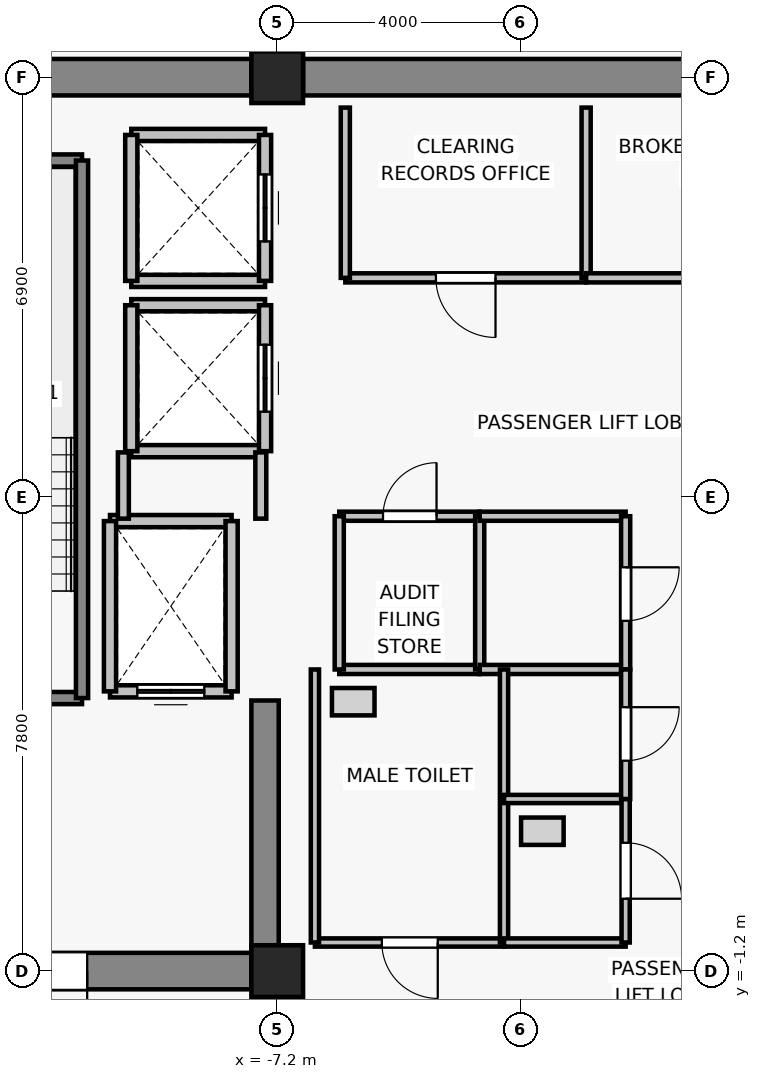
"""IFC4 building model, lengths in metres.
Left out: names, types, materials, properties, quantities, classifications, styles, units other than length and angle.
Written with IfcOpenShell. Run it as: python <this file> out.ifc"""

import sys

from ifc_helpers import new_model, si_unit, direction, frame, frame_2d, origin, origin_2d, place, context, subcontext, project, spatial, rectangle, extrude, source, transform, mapped, element, fill, save


model = new_model("IFC4")
c1 = context("Model", 3, precision=1e-05, world=origin(), true_north=direction((0.0, 1.0)))
c2 = subcontext(c1, "Body", "Model", "MODEL_VIEW")
j1 = project(units=[si_unit("LENGTHUNIT", "METRE"), si_unit("PLANEANGLEUNIT", "RADIAN")], contexts=[c1])
p1 = place(None, origin())
s1 = spatial("IfcSite", under=j1, at=p1, CompositionType="ELEMENT")
p2 = place(p1, origin())
s2 = spatial("IfcBuilding", under=s1, at=p2, CompositionType="ELEMENT")
p3 = place(p2, frame((0.0, 0.0, 241.9)))
s3 = spatial("IfcBuildingStorey", under=s2, at=p3, CompositionType="ELEMENT", Elevation=241.9)
for number, where, z_axis, x_axis in (
    (1, (-7.2, -1.2, 0.0), (0.0, 0.0, 1.0), (1.0, 0.0, 0.0)),
    (2, (-7.2, 13.5, 0.0), (0.0, 0.0, 1.0), (1.0, 0.0, 0.0)),
):
    element("IfcColumn", number, at=place(p3, frame(where, z_axis=z_axis, x_axis=x_axis)), inside=s3, PredefinedType="COLUMN", context=c2, shape_type="SweptSolid", body=[
        extrude(rectangle(XDim=0.85, YDim=0.85, at=origin_2d()), origin(), (0.0, 0.0, 1.0), 3.3),
    ])
p4 = place(p3, frame((-13.975, 13.5, 0.0), z_axis=(0.0, 0.0, 1.0), x_axis=(1.0, 0.0, 0.0)))
e3 = element("IfcWall", 3, at=p4, inside=s3, PredefinedType="SHEAR", context=c2, shape_type="SweptSolid", body=[
    extrude(rectangle(XDim=6.35, YDim=0.6, at=frame_2d((3.175, 0.0))), origin(), (0.0, 0.0, 1.0), 3.075),
])
p5 = place(p3, frame((-6.775, 13.5, 0.0), z_axis=(0.0, 0.0, 1.0), x_axis=(1.0, 0.0, 0.0)))
e4 = element("IfcWall", 4, at=p5, inside=s3, PredefinedType="SHEAR", context=c2, shape_type="SweptSolid", body=[
    extrude(rectangle(XDim=13.55, YDim=0.6, at=frame_2d((6.775, 0.0))), origin(), (0.0, 0.0, 1.0), 3.075),
])
p6 = place(p3, frame((-7.625, -1.2, 0.0), z_axis=(0.0, 0.0, 1.0), x_axis=(-1.0, 0.0, 0.0)))
e5 = element("IfcWall", 5, at=p6, inside=s3, PredefinedType="SHEAR", context=c2, shape_type="SweptSolid", body=[
    extrude(rectangle(XDim=6.35, YDim=0.6, at=frame_2d((3.175, 0.0))), origin(), (0.0, 0.0, 1.0), 3.075),
])
p7 = place(p6, frame((2.7, 0.0, 0.0)))
e6 = element("IfcOpeningElement", 6, at=p7, cuts=e5, PredefinedType="OPENING", context=c2, shape_type="SweptSolid", body=[
    extrude(rectangle(XDim=1.15, YDim=2.15, at=frame_2d((0.575, 1.075))), frame((0.0, 0.31, 0.0), z_axis=(0.0, -1.0, 0.0), x_axis=(1.0, 0.0, 0.0)), (0.0, 0.0, 1.0), 0.62),
])
p8 = place(p3, frame((-7.4, -0.9, 0.0), z_axis=(0.0, 0.0, 1.0), x_axis=(0.0, 1.0, 0.0)))
e7 = element("IfcWall", 7, at=p8, inside=s3, PredefinedType="SHEAR", context=c2, shape_type="SweptSolid", body=[
    extrude(rectangle(XDim=4.15, YDim=0.45, at=frame_2d((2.075, 0.0))), origin(), (0.0, 0.0, 1.0), 3.075),
])
p9 = place(p3, frame((-7.95, 3.4, 0.0), z_axis=(0.0, 0.0, 1.0), x_axis=(-1.0, 0.0, 0.0)))
e8 = element("IfcWall", 8, at=p9, inside=s3, PredefinedType="SOLIDWALL", context=c2, shape_type="SweptSolid", body=[
    extrude(rectangle(XDim=2.0, YDim=0.2, at=frame_2d((1.0, 0.0))), origin(), (0.0, 0.0, 1.0), 3.075),
])
p10 = place(p9, frame((0.45, 0.0, 0.0)))
e9 = element("IfcOpeningElement", 9, at=p10, cuts=e8, PredefinedType="OPENING", context=c2, shape_type="SweptSolid", body=[
    extrude(rectangle(XDim=1.1, YDim=2.2, at=frame_2d((0.55, 1.1))), frame((0.0, 0.11, 0.0), z_axis=(0.0, -1.0, 0.0), x_axis=(1.0, 0.0, 0.0)), (0.0, 0.0, 1.0), 0.22),
])
p11 = place(p3, frame((-9.95, 6.2, 0.0), z_axis=(0.0, 0.0, 1.0), x_axis=(1.0, 0.0, 0.0)))
e10 = element("IfcWall", 10, at=p11, inside=s3, PredefinedType="SOLIDWALL", context=c2, shape_type="SweptSolid", body=[
    extrude(rectangle(XDim=2.0, YDim=0.2, at=frame_2d((1.0, 0.0))), origin(), (0.0, 0.0, 1.0), 3.075),
])
for number, where, z_axis, x_axis in (
    (11, (-9.95, 3.4, 0.0), (0.0, 0.0, 1.0), (0.0, 1.0, 0.0)),
    (12, (-7.95, 6.2, 0.0), (0.0, 0.0, 1.0), (0.0, -1.0, 0.0)),
):
    element("IfcWall", number, at=place(p3, frame(where, z_axis=z_axis, x_axis=x_axis)), inside=s3, PredefinedType="SOLIDWALL", context=c2, shape_type="SweptSolid", body=[
        extrude(rectangle(XDim=2.8, YDim=0.2, at=frame_2d((1.4, 0.0))), origin(), (0.0, 0.0, 1.0), 3.075),
    ])
for number, where, z_axis, x_axis in (
    (13, (-7.4, 7.35, 0.0), (0.0, 0.0, 1.0), (-1.0, 0.0, 0.0)),
    (14, (-9.6, 9.75, 0.0), (0.0, 0.0, 1.0), (1.0, 0.0, 0.0)),
):
    element("IfcWall", number, at=place(p3, frame(where, z_axis=z_axis, x_axis=x_axis)), inside=s3, PredefinedType="SOLIDWALL", context=c2, shape_type="SweptSolid", body=[
        extrude(rectangle(XDim=2.2, YDim=0.2, at=frame_2d((1.1, 0.0))), origin(), (0.0, 0.0, 1.0), 2.615),
    ])
p12 = place(p3, frame((-9.6, 7.35, 0.0), z_axis=(0.0, 0.0, 1.0), x_axis=(0.0, 1.0, 0.0)))
e15 = element("IfcWall", 15, at=p12, inside=s3, PredefinedType="SOLIDWALL", context=c2, shape_type="SweptSolid", body=[
    extrude(rectangle(XDim=2.4, YDim=0.2, at=frame_2d((1.2, 0.0))), origin(), (0.0, 0.0, 1.0), 3.075),
])
p13 = place(p3, frame((-7.4, 9.75, 0.0), z_axis=(0.0, 0.0, 1.0), x_axis=(0.0, -1.0, 0.0)))
e16 = element("IfcWall", 16, at=p13, inside=s3, PredefinedType="SOLIDWALL", context=c2, shape_type="SweptSolid", body=[
    extrude(rectangle(XDim=2.4, YDim=0.2, at=frame_2d((1.2, 0.0))), origin(), (0.0, 0.0, 1.0), 2.615),
])
p14 = place(p13, frame((0.65, 0.0, 0.0)))
e17 = element("IfcOpeningElement", 17, at=p14, cuts=e16, PredefinedType="OPENING", context=c2, shape_type="SweptSolid", body=[
    extrude(rectangle(XDim=1.1, YDim=2.2, at=frame_2d((0.55, 1.1))), frame((0.0, 0.11, 0.0), z_axis=(0.0, -1.0, 0.0), x_axis=(1.0, 0.0, 0.0)), (0.0, 0.0, 1.0), 0.22),
])
for number, where, z_axis, x_axis in (
    (18, (-7.4, 10.15, 0.0), (0.0, 0.0, 1.0), (-1.0, 0.0, 0.0)),
    (19, (-9.6, 12.55, 0.0), (0.0, 0.0, 1.0), (1.0, 0.0, 0.0)),
):
    element("IfcWall", number, at=place(p3, frame(where, z_axis=z_axis, x_axis=x_axis)), inside=s3, PredefinedType="SOLIDWALL", context=c2, shape_type="SweptSolid", body=[
        extrude(rectangle(XDim=2.2, YDim=0.2, at=frame_2d((1.1, 0.0))), origin(), (0.0, 0.0, 1.0), 2.615),
    ])
p15 = place(p3, frame((-9.6, 10.15, 0.0), z_axis=(0.0, 0.0, 1.0), x_axis=(0.0, 1.0, 0.0)))
e20 = element("IfcWall", 20, at=p15, inside=s3, PredefinedType="SOLIDWALL", context=c2, shape_type="SweptSolid", body=[
    extrude(rectangle(XDim=2.4, YDim=0.2, at=frame_2d((1.2, 0.0))), origin(), (0.0, 0.0, 1.0), 3.075),
])
p16 = place(p3, frame((-7.4, 12.55, 0.0), z_axis=(0.0, 0.0, 1.0), x_axis=(0.0, -1.0, 0.0)))
e21 = element("IfcWall", 21, at=p16, inside=s3, PredefinedType="SOLIDWALL", context=c2, shape_type="SweptSolid", body=[
    extrude(rectangle(XDim=2.4, YDim=0.2, at=frame_2d((1.2, 0.0))), origin(), (0.0, 0.0, 1.0), 2.615),
])
p17 = place(p16, frame((0.65, 0.0, 0.0)))
e22 = element("IfcOpeningElement", 22, at=p17, cuts=e21, PredefinedType="OPENING", context=c2, shape_type="SweptSolid", body=[
    extrude(rectangle(XDim=1.1, YDim=2.2, at=frame_2d((0.55, 1.1))), frame((0.0, 0.11, 0.0), z_axis=(0.0, -1.0, 0.0), x_axis=(1.0, 0.0, 0.0)), (0.0, 0.0, 1.0), 0.22),
])
p18 = place(p3, frame((-10.41, 3.29, 0.0), z_axis=(0.0, 0.0, 1.0), x_axis=(-1.0, 0.0, 0.0)))
e23 = element("IfcWall", 23, at=p18, inside=s3, PredefinedType="SOLIDWALL", context=c2, shape_type="SweptSolid", body=[
    extrude(rectangle(XDim=3.52, YDim=0.2, at=frame_2d((1.76, 0.0))), origin(), (0.0, 0.0, 1.0), 3.075),
])
p19 = place(p18, frame((1.165, 0.0, 0.0)))
e24 = element("IfcOpeningElement", 24, at=p19, cuts=e23, PredefinedType="OPENING", context=c2, shape_type="SweptSolid", body=[
    extrude(rectangle(XDim=1.15, YDim=2.15, at=frame_2d((0.575, 1.075))), frame((0.0, 0.11, 0.0), z_axis=(0.0, -1.0, 0.0), x_axis=(1.0, 0.0, 0.0)), (0.0, 0.0, 1.0), 0.22),
])
p20 = place(p3, frame((-13.93, 12.13, 0.0), z_axis=(0.0, 0.0, 1.0), x_axis=(1.0, 0.0, 0.0)))
e25 = element("IfcWall", 25, at=p20, inside=s3, PredefinedType="SOLIDWALL", context=c2, shape_type="SweptSolid", body=[
    extrude(rectangle(XDim=3.52, YDim=0.2, at=frame_2d((1.76, 0.0))), origin(), (0.0, 0.0, 1.0), 3.075),
])
p21 = place(p3, frame((-10.41, 12.13, 0.0), z_axis=(0.0, 0.0, 1.0), x_axis=(0.0, -1.0, 0.0)))
e26 = element("IfcWall", 26, at=p21, inside=s3, PredefinedType="SOLIDWALL", context=c2, shape_type="SweptSolid", body=[
    extrude(rectangle(XDim=8.84, YDim=0.2, at=frame_2d((4.42, 0.0))), origin(), (0.0, 0.0, 1.0), 3.075),
])
p22 = place(p3, frame((-9.73, 6.24, 0.0), z_axis=(0.0, 0.0, 1.0), x_axis=(0.0, 1.0, 0.0)))
e27 = element("IfcWall", 27, at=p22, inside=s3, PredefinedType="PARTITIONING", context=c2, shape_type="SweptSolid", body=[
    extrude(rectangle(XDim=1.09, YDim=0.18, at=frame_2d((0.545, 0.0))), origin(), (0.0, 0.0, 1.0), 3.075),
])
p23 = place(p3, frame((-7.47, 7.33, 0.0), z_axis=(0.0, 0.0, 1.0), x_axis=(0.0, -1.0, 0.0)))
e28 = element("IfcWall", 28, at=p23, inside=s3, PredefinedType="PARTITIONING", context=c2, shape_type="SweptSolid", body=[
    extrude(rectangle(XDim=1.09, YDim=0.18, at=frame_2d((0.545, 0.0))), origin(), (0.0, 0.0, 1.0), 2.615),
])
p24 = place(p3, frame((-2.12, 10.2, 0.0), z_axis=(0.0, 0.0, 1.0), x_axis=(-1.0, 0.0, 0.0)))
e29 = element("IfcWall", 29, at=p24, inside=s3, PredefinedType="PARTITIONING", context=c2, shape_type="SweptSolid", body=[
    extrude(rectangle(XDim=3.96, YDim=0.15, at=frame_2d((1.98, 0.0))), origin(), (0.0, 0.0, 1.0), 3.075),
])
p25 = place(p24, frame((1.49, 0.0, 0.0)))
e30 = element("IfcOpeningElement", 30, at=p25, cuts=e29, PredefinedType="OPENING", context=c2, shape_type="SweptSolid", body=[
    extrude(rectangle(XDim=0.98, YDim=2.15, at=frame_2d((0.49, 1.075))), frame((0.0, 0.085, 0.0), z_axis=(0.0, -1.0, 0.0), x_axis=(1.0, 0.0, 0.0)), (0.0, 0.0, 1.0), 0.17),
])
for number, where, z_axis, x_axis in (
    (31, (-6.08, 10.2, 0.0), (0.0, 0.0, 1.0), (0.0, 1.0, 0.0)),
    (32, (-2.12, 13.0, 0.0), (0.0, 0.0, 1.0), (0.0, -1.0, 0.0)),
):
    element("IfcWall", number, at=place(p3, frame(where, z_axis=z_axis, x_axis=x_axis)), inside=s3, PredefinedType="PARTITIONING", context=c2, shape_type="SweptSolid", body=[
        extrude(rectangle(XDim=2.8, YDim=0.15, at=frame_2d((1.4, 0.0))), origin(), (0.0, 0.0, 1.0), 3.075),
    ])
p26 = place(p3, frame((2.04, 10.2, 0.0), z_axis=(0.0, 0.0, 1.0), x_axis=(-1.0, 0.0, 0.0)))
e33 = element("IfcWall", 33, at=p26, inside=s3, PredefinedType="PARTITIONING", context=c2, shape_type="SweptSolid", body=[
    extrude(rectangle(XDim=4.16, YDim=0.15, at=frame_2d((2.08, 0.0))), origin(), (0.0, 0.0, 1.0), 3.075),
])
p27 = place(p26, frame((1.55, 0.0, 0.0)))
e34 = element("IfcOpeningElement", 34, at=p27, cuts=e33, PredefinedType="OPENING", context=c2, shape_type="SweptSolid", body=[
    extrude(rectangle(XDim=0.98, YDim=2.15, at=frame_2d((0.49, 1.075))), frame((0.0, 0.085, 0.0), z_axis=(0.0, -1.0, 0.0), x_axis=(1.0, 0.0, 0.0)), (0.0, 0.0, 1.0), 0.17),
])
p28 = place(p3, frame((-3.87, 3.76, 0.0), z_axis=(0.0, 0.0, 1.0), x_axis=(-1.0, 0.0, 0.0)))
e35 = element("IfcWall", 35, at=p28, inside=s3, PredefinedType="PARTITIONING", context=c2, shape_type="SweptSolid", body=[
    extrude(rectangle(XDim=2.31, YDim=0.15, at=frame_2d((1.155, 0.0))), origin(), (0.0, 0.0, 1.0), 3.075),
])
p29 = place(p3, frame((-6.18, 6.28, 0.0), z_axis=(0.0, 0.0, 1.0), x_axis=(1.0, 0.0, 0.0)))
e36 = element("IfcWall", 36, at=p29, inside=s3, PredefinedType="PARTITIONING", context=c2, shape_type="SweptSolid", body=[
    extrude(rectangle(XDim=2.31, YDim=0.15, at=frame_2d((1.155, 0.0))), origin(), (0.0, 0.0, 1.0), 3.075),
])
p30 = place(p29, frame((0.72, 0.0, 0.0)))
e37 = element("IfcOpeningElement", 37, at=p30, cuts=e36, PredefinedType="OPENING", context=c2, shape_type="SweptSolid", body=[
    extrude(rectangle(XDim=0.88, YDim=2.1, at=frame_2d((0.44, 1.05))), frame((0.0, 0.085, 0.0), z_axis=(0.0, -1.0, 0.0), x_axis=(1.0, 0.0, 0.0)), (0.0, 0.0, 1.0), 0.17),
])
for number, where, z_axis, x_axis in (
    (38, (-6.18, 3.76, 0.0), (0.0, 0.0, 1.0), (0.0, 1.0, 0.0)),
    (39, (-3.87, 6.28, 0.0), (0.0, 0.0, 1.0), (0.0, -1.0, 0.0)),
):
    element("IfcWall", number, at=place(p3, frame(where, z_axis=z_axis, x_axis=x_axis)), inside=s3, PredefinedType="PARTITIONING", context=c2, shape_type="SweptSolid", body=[
        extrude(rectangle(XDim=2.52, YDim=0.15, at=frame_2d((1.26, 0.0))), origin(), (0.0, 0.0, 1.0), 3.075),
    ])
for number, where, z_axis, x_axis in (
    (40, (-1.47, 3.76, 0.0), (0.0, 0.0, 1.0), (-1.0, 0.0, 0.0)),
    (41, (-3.87, 6.28, 0.0), (0.0, 0.0, 1.0), (1.0, 0.0, 0.0)),
):
    element("IfcWall", number, at=place(p3, frame(where, z_axis=z_axis, x_axis=x_axis)), inside=s3, PredefinedType="PARTITIONING", context=c2, shape_type="SweptSolid", body=[
        extrude(rectangle(XDim=2.4, YDim=0.15, at=frame_2d((1.2, 0.0))), origin(), (0.0, 0.0, 1.0), 3.075),
    ])
p31 = place(p3, frame((-1.47, 6.28, 0.0), z_axis=(0.0, 0.0, 1.0), x_axis=(0.0, -1.0, 0.0)))
e42 = element("IfcWall", 42, at=p31, inside=s3, PredefinedType="PARTITIONING", context=c2, shape_type="SweptSolid", body=[
    extrude(rectangle(XDim=2.52, YDim=0.15, at=frame_2d((1.26, 0.0))), origin(), (0.0, 0.0, 1.0), 3.075),
])
p32 = place(p31, frame((0.84, 0.0, 0.0)))
e43 = element("IfcOpeningElement", 43, at=p32, cuts=e42, PredefinedType="OPENING", context=c2, shape_type="SweptSolid", body=[
    extrude(rectangle(XDim=0.88, YDim=2.1, at=frame_2d((0.44, 1.05))), frame((0.0, 0.085, 0.0), z_axis=(0.0, -1.0, 0.0), x_axis=(1.0, 0.0, 0.0)), (0.0, 0.0, 1.0), 0.17),
])
p33 = place(p3, frame((-3.47, -0.73, 0.0), z_axis=(0.0, 0.0, 1.0), x_axis=(-1.0, 0.0, 0.0)))
e44 = element("IfcWall", 44, at=p33, inside=s3, PredefinedType="PARTITIONING", context=c2, shape_type="SweptSolid", body=[
    extrude(rectangle(XDim=3.11, YDim=0.135, at=frame_2d((1.555, 0.0))), origin(), (0.0, 0.0, 1.0), 3.075),
])
p34 = place(p33, frame((1.09, 0.0, 0.0)))
e45 = element("IfcOpeningElement", 45, at=p34, cuts=e44, PredefinedType="OPENING", context=c2, shape_type="SweptSolid", body=[
    extrude(rectangle(XDim=0.92, YDim=2.1, at=frame_2d((0.46, 1.05))), frame((0.0, 0.077, 0.0), z_axis=(0.0, -1.0, 0.0), x_axis=(1.0, 0.0, 0.0)), (0.0, 0.0, 1.0), 0.155),
])
for number, where, z_axis, x_axis in (
    (46, (-6.58, -0.73, 0.0), (0.0, 0.0, 1.0), (0.0, 1.0, 0.0)),
    (47, (-3.47, 3.76, 0.0), (0.0, 0.0, 1.0), (0.0, -1.0, 0.0)),
):
    element("IfcWall", number, at=place(p3, frame(where, z_axis=z_axis, x_axis=x_axis)), inside=s3, PredefinedType="PARTITIONING", context=c2, shape_type="SweptSolid", body=[
        extrude(rectangle(XDim=4.49, YDim=0.135, at=frame_2d((2.245, 0.0))), origin(), (0.0, 0.0, 1.0), 3.075),
    ])
for number, where, z_axis, x_axis in (
    (48, (-1.47, -0.73, 0.0), (0.0, 0.0, 1.0), (-1.0, 0.0, 0.0)),
    (49, (-3.47, 1.63, 0.0), (0.0, 0.0, 1.0), (1.0, 0.0, 0.0)),
):
    element("IfcWall", number, at=place(p3, frame(where, z_axis=z_axis, x_axis=x_axis)), inside=s3, PredefinedType="PARTITIONING", context=c2, shape_type="SweptSolid", body=[
        extrude(rectangle(XDim=2.0, YDim=0.135, at=frame_2d((1.0, 0.0))), origin(), (0.0, 0.0, 1.0), 3.075),
    ])
p35 = place(p3, frame((-1.47, 1.63, 0.0), z_axis=(0.0, 0.0, 1.0), x_axis=(0.0, -1.0, 0.0)))
e50 = element("IfcWall", 50, at=p35, inside=s3, PredefinedType="PARTITIONING", context=c2, shape_type="SweptSolid", body=[
    extrude(rectangle(XDim=2.36, YDim=0.135, at=frame_2d((1.18, 0.0))), origin(), (0.0, 0.0, 1.0), 3.075),
])
p36 = place(p35, frame((0.72, 0.0, 0.0)))
e51 = element("IfcOpeningElement", 51, at=p36, cuts=e50, PredefinedType="OPENING", context=c2, shape_type="SweptSolid", body=[
    extrude(rectangle(XDim=0.92, YDim=2.1, at=frame_2d((0.46, 1.05))), frame((0.0, 0.077, 0.0), z_axis=(0.0, -1.0, 0.0), x_axis=(1.0, 0.0, 0.0)), (0.0, 0.0, 1.0), 0.155),
])
p37 = place(p3, frame((-1.47, 3.76, 0.0), z_axis=(0.0, 0.0, 1.0), x_axis=(0.0, -1.0, 0.0)))
e52 = element("IfcWall", 52, at=p37, inside=s3, PredefinedType="PARTITIONING", context=c2, shape_type="SweptSolid", body=[
    extrude(rectangle(XDim=2.13, YDim=0.15, at=frame_2d((1.065, 0.0))), origin(), (0.0, 0.0, 1.0), 3.075),
])
p38 = place(p37, frame((0.62, 0.0, 0.0)))
e53 = element("IfcOpeningElement", 53, at=p38, cuts=e52, PredefinedType="OPENING", context=c2, shape_type="SweptSolid", body=[
    extrude(rectangle(XDim=0.88, YDim=2.1, at=frame_2d((0.44, 1.05))), frame((0.0, 0.085, 0.0), z_axis=(0.0, -1.0, 0.0), x_axis=(1.0, 0.0, 0.0)), (0.0, 0.0, 1.0), 0.17),
])
m1 = source(origin(), c2, "Body", "SweptSolid", [
    extrude(rectangle(XDim=1.1, YDim=2.2, at=frame_2d((0.55, 1.1))), frame((0.0, 0.025, 0.0), z_axis=(0.0, -1.0, 0.0), x_axis=(1.0, 0.0, 0.0)), (0.0, 0.0, 1.0), 0.05),
])
p39 = place(p10, origin())
e54 = element("IfcDoor", 54, at=p39, inside=s3, OperationType="DOUBLE_DOOR_SLIDING", PredefinedType="DOOR", context=c2, shape_type="MappedRepresentation", body=[
    mapped(m1, transform((0.0, 0.0, 0.0), x_axis=(1.0, 0.0, 0.0), y_axis=(0.0, 1.0, 0.0), z_axis=(0.0, 0.0, 1.0), scale=1.0)),
])
fill(e9, e54)
p40 = place(p14, origin())
e55 = element("IfcDoor", 55, at=p40, inside=s3, OperationType="DOUBLE_DOOR_SLIDING", PredefinedType="DOOR", context=c2, shape_type="MappedRepresentation", body=[
    mapped(m1, transform((0.0, 0.0, 0.0), x_axis=(1.0, 0.0, 0.0), y_axis=(0.0, 1.0, 0.0), z_axis=(0.0, 0.0, 1.0), scale=1.0)),
])
fill(e17, e55)
p41 = place(p17, origin())
e56 = element("IfcDoor", 56, at=p41, inside=s3, OperationType="DOUBLE_DOOR_SLIDING", PredefinedType="DOOR", context=c2, shape_type="MappedRepresentation", body=[
    mapped(m1, transform((0.0, 0.0, 0.0), x_axis=(1.0, 0.0, 0.0), y_axis=(0.0, 1.0, 0.0), z_axis=(0.0, 0.0, 1.0), scale=1.0)),
])
fill(e22, e56)
m2 = source(origin(), c2, "Body", "SweptSolid", [
    extrude(rectangle(XDim=1.15, YDim=2.15, at=frame_2d((0.575, 1.075))), frame((0.0, 0.025, 0.0), z_axis=(0.0, -1.0, 0.0), x_axis=(1.0, 0.0, 0.0)), (0.0, 0.0, 1.0), 0.05),
])
p42 = place(p7, origin())
e57 = element("IfcDoor", 57, at=p42, inside=s3, OperationType="SINGLE_SWING_LEFT", PredefinedType="DOOR", context=c2, shape_type="MappedRepresentation", body=[
    mapped(m2, transform((0.0, 0.0, 0.0), x_axis=(1.0, 0.0, 0.0), y_axis=(0.0, 1.0, 0.0), z_axis=(0.0, 0.0, 1.0), scale=1.0)),
])
fill(e6, e57)
m3 = source(origin(), c2, "Body", "SweptSolid", [
    extrude(rectangle(XDim=0.98, YDim=2.15, at=frame_2d((0.49, 1.075))), frame((0.0, 0.025, 0.0), z_axis=(0.0, -1.0, 0.0), x_axis=(1.0, 0.0, 0.0)), (0.0, 0.0, 1.0), 0.05),
])
p43 = place(p25, origin())
e58 = element("IfcDoor", 58, at=p43, inside=s3, OperationType="SINGLE_SWING_LEFT", PredefinedType="DOOR", context=c2, shape_type="MappedRepresentation", body=[
    mapped(m3, transform((0.0, 0.0, 0.0), x_axis=(1.0, 0.0, 0.0), y_axis=(0.0, 1.0, 0.0), z_axis=(0.0, 0.0, 1.0), scale=1.0)),
])
fill(e30, e58)
m4 = source(origin(), c2, "Body", "SweptSolid", [
    extrude(rectangle(XDim=0.88, YDim=2.1, at=frame_2d((0.44, 1.05))), frame((0.0, 0.025, 0.0), z_axis=(0.0, -1.0, 0.0), x_axis=(1.0, 0.0, 0.0)), (0.0, 0.0, 1.0), 0.05),
])
p44 = place(p30, origin())
e59 = element("IfcDoor", 59, at=p44, inside=s3, OperationType="SINGLE_SWING_RIGHT", PredefinedType="DOOR", context=c2, shape_type="MappedRepresentation", body=[
    mapped(m4, transform((0.0, 0.0, 0.0), x_axis=(1.0, 0.0, 0.0), y_axis=(0.0, 1.0, 0.0), z_axis=(0.0, 0.0, 1.0), scale=1.0)),
])
fill(e37, e59)
p45 = place(p32, origin())
e60 = element("IfcDoor", 60, at=p45, inside=s3, OperationType="SINGLE_SWING_LEFT", PredefinedType="DOOR", context=c2, shape_type="MappedRepresentation", body=[
    mapped(m4, transform((0.0, 0.0, 0.0), x_axis=(1.0, 0.0, 0.0), y_axis=(0.0, 1.0, 0.0), z_axis=(0.0, 0.0, 1.0), scale=1.0)),
])
fill(e43, e60)
m5 = source(origin(), c2, "Body", "SweptSolid", [
    extrude(rectangle(XDim=0.92, YDim=2.1, at=frame_2d((0.46, 1.05))), frame((0.0, 0.025, 0.0), z_axis=(0.0, -1.0, 0.0), x_axis=(1.0, 0.0, 0.0)), (0.0, 0.0, 1.0), 0.05),
])
p46 = place(p34, origin())
e61 = element("IfcDoor", 61, at=p46, inside=s3, OperationType="SINGLE_SWING_LEFT", PredefinedType="DOOR", context=c2, shape_type="MappedRepresentation", body=[
    mapped(m5, transform((0.0, 0.0, 0.0), x_axis=(1.0, 0.0, 0.0), y_axis=(0.0, 1.0, 0.0), z_axis=(0.0, 0.0, 1.0), scale=1.0)),
])
fill(e45, e61)
p47 = place(p36, origin())
e62 = element("IfcDoor", 62, at=p47, inside=s3, OperationType="SINGLE_SWING_RIGHT", PredefinedType="DOOR", context=c2, shape_type="MappedRepresentation", body=[
    mapped(m5, transform((0.0, 0.0, 0.0), x_axis=(1.0, 0.0, 0.0), y_axis=(0.0, 1.0, 0.0), z_axis=(0.0, 0.0, 1.0), scale=1.0)),
])
fill(e51, e62)
p48 = place(p38, origin())
e63 = element("IfcDoor", 63, at=p48, inside=s3, OperationType="SINGLE_SWING_LEFT", PredefinedType="DOOR", context=c2, shape_type="MappedRepresentation", body=[
    mapped(m4, transform((0.0, 0.0, 0.0), x_axis=(1.0, 0.0, 0.0), y_axis=(0.0, 1.0, 0.0), z_axis=(0.0, 0.0, 1.0), scale=1.0)),
])
fill(e53, e63)
save(model, sys.argv[1])
